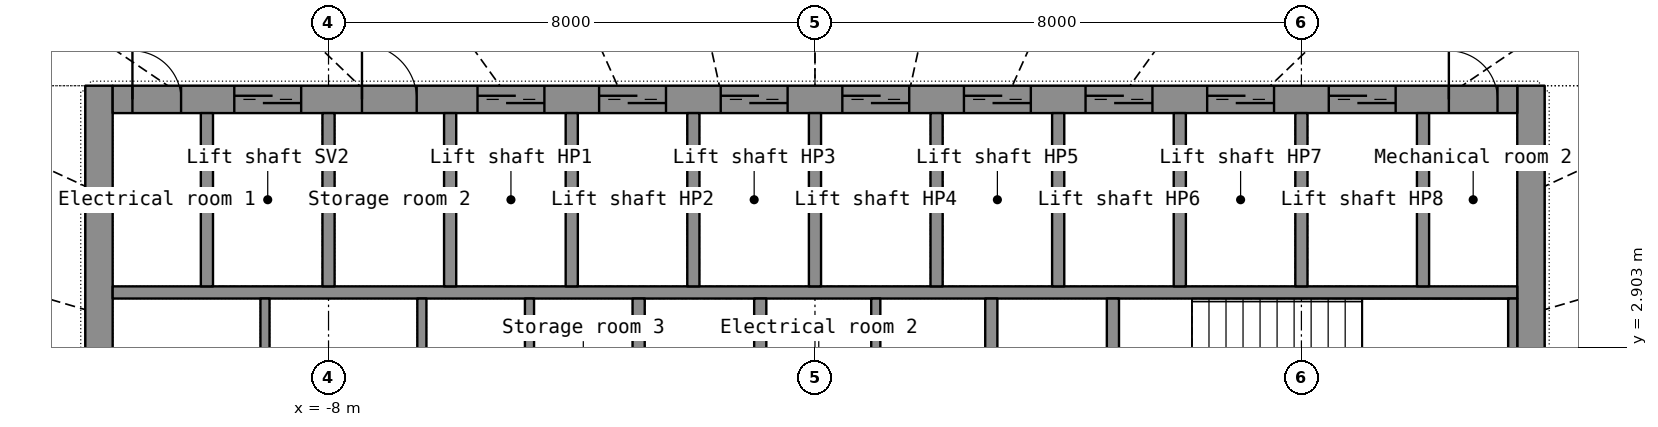
"""IFC4 building model, lengths in metres.
Left out: names, types, materials, properties, quantities, classifications, styles, units other than length and angle.
Written with IfcOpenShell. Run it as: python <this file> out.ifc"""

import sys

from ifc_helpers import new_model, si_unit, direction, frame, frame_2d, origin, place, context, subcontext, project, spatial, rectangle, extrude, element, fill, save


model = new_model("IFC4")
c1 = context("Model", 3, precision=1e-05, world=origin(), true_north=direction((0.0, 1.0)))
c2 = subcontext(c1, "Body", "Model", "MODEL_VIEW")
j1 = project(units=[si_unit("LENGTHUNIT", "METRE"), si_unit("PLANEANGLEUNIT", "RADIAN")], contexts=[c1])
p1 = place(None, origin())
s1 = spatial("IfcSite", under=j1, at=p1, CompositionType="ELEMENT")
p2 = place(p1, origin())
s2 = spatial("IfcBuilding", under=s1, at=p2, CompositionType="ELEMENT")
p3 = place(p2, frame((0.0, 0.0, 175.6)))
s3 = spatial("IfcBuildingStorey", under=s2, at=p3, CompositionType="ELEMENT", Elevation=175.6)
p4 = place(p3, frame((-11.775, -7.2, 0.0), z_axis=(0.0, 0.0, 1.0), x_axis=(0.0, 1.0, 0.0)))
e1 = element("IfcWall", 1, at=p4, inside=s3, PredefinedType="SHEAR", context=c2, shape_type="SweptSolid", body=[
    extrude(rectangle(XDim=14.4, YDim=0.45, at=frame_2d((7.2, 0.0))), origin(), (0.0, 0.0, 1.0), 3.3),
])
p5 = place(p4, frame((6.5, 0.0, 0.0)))
e2 = element("IfcOpeningElement", 2, at=p5, cuts=e1, PredefinedType="OPENING", context=c2, shape_type="SweptSolid", body=[
    extrude(rectangle(XDim=1.4, YDim=2.2, at=frame_2d((0.7, 1.1))), frame((0.0, 0.235, 0.0), z_axis=(0.0, -1.0, 0.0), x_axis=(1.0, 0.0, 0.0)), (0.0, 0.0, 1.0), 0.47),
])
p6 = place(p3, frame((11.775, -7.2, 0.0), z_axis=(0.0, 0.0, 1.0), x_axis=(0.0, 1.0, 0.0)))
e3 = element("IfcWall", 3, at=p6, inside=s3, PredefinedType="SHEAR", context=c2, shape_type="SweptSolid", body=[
    extrude(rectangle(XDim=14.4, YDim=0.45, at=frame_2d((7.2, 0.0))), origin(), (0.0, 0.0, 1.0), 3.3),
])
p7 = place(p6, frame((6.5, 0.0, 0.0)))
e4 = element("IfcOpeningElement", 4, at=p7, cuts=e3, PredefinedType="OPENING", context=c2, shape_type="SweptSolid", body=[
    extrude(rectangle(XDim=1.4, YDim=2.2, at=frame_2d((0.7, 1.1))), frame((0.0, 0.235, 0.0), z_axis=(0.0, -1.0, 0.0), x_axis=(1.0, 0.0, 0.0)), (0.0, 0.0, 1.0), 0.47),
])
p8 = place(p3, frame((-11.55, 6.975, 0.0), z_axis=(0.0, 0.0, 1.0), x_axis=(1.0, 0.0, 0.0)))
e5 = element("IfcWall", 5, at=p8, inside=s3, PredefinedType="SHEAR", context=c2, shape_type="SweptSolid", body=[
    extrude(rectangle(XDim=23.1, YDim=0.45, at=frame_2d((11.55, 0.0))), origin(), (0.0, 0.0, 1.0), 3.3),
])
p9 = place(p8, frame((2.0, 0.0, 0.0)))
e6 = element("IfcOpeningElement", 6, at=p9, cuts=e5, PredefinedType="OPENING", context=c2, shape_type="SweptSolid", body=[
    extrude(rectangle(XDim=1.1, YDim=2.2, at=frame_2d((0.55, 1.1))), frame((0.0, 0.235, 0.0), z_axis=(0.0, -1.0, 0.0), x_axis=(1.0, 0.0, 0.0)), (0.0, 0.0, 1.0), 0.47),
])
p10 = place(p8, frame((6.0, 0.0, 0.0)))
e7 = element("IfcOpeningElement", 7, at=p10, cuts=e5, PredefinedType="OPENING", context=c2, shape_type="SweptSolid", body=[
    extrude(rectangle(XDim=1.1, YDim=2.2, at=frame_2d((0.55, 1.1))), frame((0.0, 0.235, 0.0), z_axis=(0.0, -1.0, 0.0), x_axis=(1.0, 0.0, 0.0)), (0.0, 0.0, 1.0), 0.47),
])
p11 = place(p8, frame((8.0, 0.0, 0.0)))
e8 = element("IfcOpeningElement", 8, at=p11, cuts=e5, PredefinedType="OPENING", context=c2, shape_type="SweptSolid", body=[
    extrude(rectangle(XDim=1.1, YDim=2.2, at=frame_2d((0.55, 1.1))), frame((0.0, 0.235, 0.0), z_axis=(0.0, -1.0, 0.0), x_axis=(1.0, 0.0, 0.0)), (0.0, 0.0, 1.0), 0.47),
])
p12 = place(p8, frame((10.0, 0.0, 0.0)))
e9 = element("IfcOpeningElement", 9, at=p12, cuts=e5, PredefinedType="OPENING", context=c2, shape_type="SweptSolid", body=[
    extrude(rectangle(XDim=1.1, YDim=2.2, at=frame_2d((0.55, 1.1))), frame((0.0, 0.235, 0.0), z_axis=(0.0, -1.0, 0.0), x_axis=(1.0, 0.0, 0.0)), (0.0, 0.0, 1.0), 0.47),
])
p13 = place(p8, frame((12.0, 0.0, 0.0)))
e10 = element("IfcOpeningElement", 10, at=p13, cuts=e5, PredefinedType="OPENING", context=c2, shape_type="SweptSolid", body=[
    extrude(rectangle(XDim=1.1, YDim=2.2, at=frame_2d((0.55, 1.1))), frame((0.0, 0.235, 0.0), z_axis=(0.0, -1.0, 0.0), x_axis=(1.0, 0.0, 0.0)), (0.0, 0.0, 1.0), 0.47),
])
p14 = place(p8, frame((14.0, 0.0, 0.0)))
e11 = element("IfcOpeningElement", 11, at=p14, cuts=e5, PredefinedType="OPENING", context=c2, shape_type="SweptSolid", body=[
    extrude(rectangle(XDim=1.1, YDim=2.2, at=frame_2d((0.55, 1.1))), frame((0.0, 0.235, 0.0), z_axis=(0.0, -1.0, 0.0), x_axis=(1.0, 0.0, 0.0)), (0.0, 0.0, 1.0), 0.47),
])
p15 = place(p8, frame((16.0, 0.0, 0.0)))
e12 = element("IfcOpeningElement", 12, at=p15, cuts=e5, PredefinedType="OPENING", context=c2, shape_type="SweptSolid", body=[
    extrude(rectangle(XDim=1.1, YDim=2.2, at=frame_2d((0.55, 1.1))), frame((0.0, 0.235, 0.0), z_axis=(0.0, -1.0, 0.0), x_axis=(1.0, 0.0, 0.0)), (0.0, 0.0, 1.0), 0.47),
])
p16 = place(p8, frame((18.0, 0.0, 0.0)))
e13 = element("IfcOpeningElement", 13, at=p16, cuts=e5, PredefinedType="OPENING", context=c2, shape_type="SweptSolid", body=[
    extrude(rectangle(XDim=1.1, YDim=2.2, at=frame_2d((0.55, 1.1))), frame((0.0, 0.235, 0.0), z_axis=(0.0, -1.0, 0.0), x_axis=(1.0, 0.0, 0.0)), (0.0, 0.0, 1.0), 0.47),
])
p17 = place(p8, frame((20.0, 0.0, 0.0)))
e14 = element("IfcOpeningElement", 14, at=p17, cuts=e5, PredefinedType="OPENING", context=c2, shape_type="SweptSolid", body=[
    extrude(rectangle(XDim=1.1, YDim=2.2, at=frame_2d((0.55, 1.1))), frame((0.0, 0.235, 0.0), z_axis=(0.0, -1.0, 0.0), x_axis=(1.0, 0.0, 0.0)), (0.0, 0.0, 1.0), 0.47),
])
p18 = place(p8, frame((4.1, 0.0, 0.0)))
e15 = element("IfcOpeningElement", 15, at=p18, cuts=e5, PredefinedType="OPENING", context=c2, shape_type="SweptSolid", body=[
    extrude(rectangle(XDim=0.9, YDim=2.1, at=frame_2d((0.45, 1.05))), frame((0.0, 0.235, 0.0), z_axis=(0.0, -1.0, 0.0), x_axis=(1.0, 0.0, 0.0)), (0.0, 0.0, 1.0), 0.47),
])
p19 = place(p8, frame((0.325, 0.0, 0.0)))
e16 = element("IfcOpeningElement", 16, at=p19, cuts=e5, PredefinedType="OPENING", context=c2, shape_type="SweptSolid", body=[
    extrude(rectangle(XDim=0.8, YDim=2.05, at=frame_2d((0.4, 1.025))), frame((0.0, 0.235, 0.0), z_axis=(0.0, -1.0, 0.0), x_axis=(1.0, 0.0, 0.0)), (0.0, 0.0, 1.0), 0.47),
])
p20 = place(p8, frame((21.975, 0.0, 0.0)))
e17 = element("IfcOpeningElement", 17, at=p20, cuts=e5, PredefinedType="OPENING", context=c2, shape_type="SweptSolid", body=[
    extrude(rectangle(XDim=0.8, YDim=2.05, at=frame_2d((0.4, 1.025))), frame((0.0, 0.235, 0.0), z_axis=(0.0, -1.0, 0.0), x_axis=(1.0, 0.0, 0.0)), (0.0, 0.0, 1.0), 0.47),
])
p21 = place(p3, frame((-11.55, 3.8, 0.0), z_axis=(0.0, 0.0, 1.0), x_axis=(1.0, 0.0, 0.0)))
e18 = element("IfcWall", 18, at=p21, inside=s3, PredefinedType="SHEAR", context=c2, shape_type="SweptSolid", body=[
    extrude(rectangle(XDim=23.1, YDim=0.2, at=frame_2d((11.55, 0.0))), origin(), (0.0, 0.0, 1.0), 3.3),
])
for number, where, z_axis, x_axis in (
    (19, (-10.0, 3.9, 0.0), (0.0, 0.0, 1.0), (0.0, 1.0, 0.0)),
    (20, (-8.0, 3.9, 0.0), (0.0, 0.0, 1.0), (0.0, 1.0, 0.0)),
    (21, (-6.0, 3.9, 0.0), (0.0, 0.0, 1.0), (0.0, 1.0, 0.0)),
    (22, (-4.0, 3.9, 0.0), (0.0, 0.0, 1.0), (0.0, 1.0, 0.0)),
    (23, (-2.0, 3.9, 0.0), (0.0, 0.0, 1.0), (0.0, 1.0, 0.0)),
    (24, (0.0, 3.9, 0.0), (0.0, 0.0, 1.0), (0.0, 1.0, 0.0)),
    (25, (2.0, 3.9, 0.0), (0.0, 0.0, 1.0), (0.0, 1.0, 0.0)),
    (26, (4.0, 3.9, 0.0), (0.0, 0.0, 1.0), (0.0, 1.0, 0.0)),
    (27, (6.0, 3.9, 0.0), (0.0, 0.0, 1.0), (0.0, 1.0, 0.0)),
    (28, (8.0, 3.9, 0.0), (0.0, 0.0, 1.0), (0.0, 1.0, 0.0)),
    (29, (10.0, 3.9, 0.0), (0.0, 0.0, 1.0), (0.0, 1.0, 0.0)),
):
    element("IfcWall", number, at=place(p3, frame(where, z_axis=z_axis, x_axis=x_axis)), inside=s3, PredefinedType="SHEAR", context=c2, shape_type="SweptSolid", body=[
        extrude(rectangle(XDim=2.85, YDim=0.2, at=frame_2d((1.425, 0.0))), origin(), (0.0, 0.0, 1.0), 3.3),
    ])
p22 = place(p3, frame((-2.9, -3.7, 0.0), z_axis=(0.0, 0.0, 1.0), x_axis=(0.0, 1.0, 0.0)))
e30 = element("IfcWall", 30, at=p22, inside=s3, PredefinedType="SHEAR", context=c2, shape_type="SweptSolid", body=[
    extrude(rectangle(XDim=7.4, YDim=0.2, at=frame_2d((3.7, 0.0))), origin(), (0.0, 0.0, 1.0), 3.3),
])
p23 = place(p22, frame((3.1, 0.0, 0.0)))
e31 = element("IfcOpeningElement", 31, at=p23, cuts=e30, PredefinedType="OPENING", context=c2, shape_type="SweptSolid", body=[
    extrude(rectangle(XDim=1.2, YDim=2.2, at=frame_2d((0.6, 1.1))), frame((0.0, 0.11, 0.0), z_axis=(0.0, -1.0, 0.0), x_axis=(1.0, 0.0, 0.0)), (0.0, 0.0, 1.0), 0.22),
])
p24 = place(p3, frame((2.9, -3.7, 0.0), z_axis=(0.0, 0.0, 1.0), x_axis=(0.0, 1.0, 0.0)))
e32 = element("IfcWall", 32, at=p24, inside=s3, PredefinedType="SHEAR", context=c2, shape_type="SweptSolid", body=[
    extrude(rectangle(XDim=7.4, YDim=0.2, at=frame_2d((3.7, 0.0))), origin(), (0.0, 0.0, 1.0), 3.3),
])
p25 = place(p24, frame((3.1, 0.0, 0.0)))
e33 = element("IfcOpeningElement", 33, at=p25, cuts=e32, PredefinedType="OPENING", context=c2, shape_type="SweptSolid", body=[
    extrude(rectangle(XDim=1.2, YDim=2.2, at=frame_2d((0.6, 1.1))), frame((0.0, 0.11, 0.0), z_axis=(0.0, -1.0, 0.0), x_axis=(1.0, 0.0, 0.0)), (0.0, 0.0, 1.0), 0.22),
])
p26 = place(p3, frame((-0.9, 1.35, 0.0), z_axis=(0.0, 0.0, 1.0), x_axis=(0.0, 1.0, 0.0)))
e34 = element("IfcWall", 34, at=p26, inside=s3, PredefinedType="SHEAR", context=c2, shape_type="SweptSolid", body=[
    extrude(rectangle(XDim=2.35, YDim=0.2, at=frame_2d((1.175, 0.0))), origin(), (0.0, 0.0, 1.0), 3.3),
])
p27 = place(p3, frame((11.475, 1.35, 0.0), z_axis=(0.0, 0.0, 1.0), x_axis=(0.0, 1.0, 0.0)))
e35 = element("IfcWall", 35, at=p27, inside=s3, PredefinedType="SHEAR", context=c2, shape_type="SweptSolid", body=[
    extrude(rectangle(XDim=2.35, YDim=0.15, at=frame_2d((1.175, 0.0))), origin(), (0.0, 0.0, 1.0), 3.3),
])
p28 = place(p3, frame((4.9, 1.35, 0.0), z_axis=(0.0, 0.0, 1.0), x_axis=(0.0, 1.0, 0.0)))
e36 = element("IfcWall", 36, at=p28, inside=s3, PredefinedType="SHEAR", context=c2, shape_type="SweptSolid", body=[
    extrude(rectangle(XDim=2.35, YDim=0.2, at=frame_2d((1.175, 0.0))), origin(), (0.0, 0.0, 1.0), 3.3),
])
for number, where, z_axis, x_axis in (
    (37, (-9.045, 1.35, 0.0), (0.0, 0.0, 1.0), (0.0, 1.0, 0.0)),
    (38, (-6.465, 1.35, 0.0), (0.0, 0.0, 1.0), (0.0, 1.0, 0.0)),
    (39, (-4.695, 1.35, 0.0), (0.0, 0.0, 1.0), (0.0, 1.0, 0.0)),
    (40, (1.0, 1.35, 0.0), (0.0, 0.0, 1.0), (0.0, 1.0, 0.0)),
):
    element("IfcWall", number, at=place(p3, frame(where, z_axis=z_axis, x_axis=x_axis)), inside=s3, PredefinedType="PARTITIONING", context=c2, shape_type="SweptSolid", body=[
        extrude(rectangle(XDim=2.35, YDim=0.15, at=frame_2d((1.175, 0.0))), origin(), (0.0, 0.0, 1.0), 3.3),
    ])
p29 = place(p9, origin())
e41 = element("IfcDoor", 41, at=p29, inside=s3, OperationType="DOUBLE_DOOR_SLIDING", PredefinedType="DOOR", context=c2, shape_type="SweptSolid", body=[
    extrude(rectangle(XDim=1.1, YDim=2.2, at=frame_2d((0.55, 1.1))), frame((0.0, 0.025, 0.0), z_axis=(0.0, -1.0, 0.0), x_axis=(1.0, 0.0, 0.0)), (0.0, 0.0, 1.0), 0.05),
])
fill(e6, e41)
p30 = place(p10, origin())
e42 = element("IfcDoor", 42, at=p30, inside=s3, OperationType="DOUBLE_DOOR_SLIDING", PredefinedType="DOOR", context=c2, shape_type="SweptSolid", body=[
    extrude(rectangle(XDim=1.1, YDim=2.2, at=frame_2d((0.55, 1.1))), frame((0.0, 0.025, 0.0), z_axis=(0.0, -1.0, 0.0), x_axis=(1.0, 0.0, 0.0)), (0.0, 0.0, 1.0), 0.05),
])
fill(e7, e42)
p31 = place(p11, origin())
e43 = element("IfcDoor", 43, at=p31, inside=s3, OperationType="DOUBLE_DOOR_SLIDING", PredefinedType="DOOR", context=c2, shape_type="SweptSolid", body=[
    extrude(rectangle(XDim=1.1, YDim=2.2, at=frame_2d((0.55, 1.1))), frame((0.0, 0.025, 0.0), z_axis=(0.0, -1.0, 0.0), x_axis=(1.0, 0.0, 0.0)), (0.0, 0.0, 1.0), 0.05),
])
fill(e8, e43)
p32 = place(p12, origin())
e44 = element("IfcDoor", 44, at=p32, inside=s3, OperationType="DOUBLE_DOOR_SLIDING", PredefinedType="DOOR", context=c2, shape_type="SweptSolid", body=[
    extrude(rectangle(XDim=1.1, YDim=2.2, at=frame_2d((0.55, 1.1))), frame((0.0, 0.025, 0.0), z_axis=(0.0, -1.0, 0.0), x_axis=(1.0, 0.0, 0.0)), (0.0, 0.0, 1.0), 0.05),
])
fill(e9, e44)
p33 = place(p13, origin())
e45 = element("IfcDoor", 45, at=p33, inside=s3, OperationType="DOUBLE_DOOR_SLIDING", PredefinedType="DOOR", context=c2, shape_type="SweptSolid", body=[
    extrude(rectangle(XDim=1.1, YDim=2.2, at=frame_2d((0.55, 1.1))), frame((0.0, 0.025, 0.0), z_axis=(0.0, -1.0, 0.0), x_axis=(1.0, 0.0, 0.0)), (0.0, 0.0, 1.0), 0.05),
])
fill(e10, e45)
p34 = place(p14, origin())
e46 = element("IfcDoor", 46, at=p34, inside=s3, OperationType="DOUBLE_DOOR_SLIDING", PredefinedType="DOOR", context=c2, shape_type="SweptSolid", body=[
    extrude(rectangle(XDim=1.1, YDim=2.2, at=frame_2d((0.55, 1.1))), frame((0.0, 0.025, 0.0), z_axis=(0.0, -1.0, 0.0), x_axis=(1.0, 0.0, 0.0)), (0.0, 0.0, 1.0), 0.05),
])
fill(e11, e46)
p35 = place(p15, origin())
e47 = element("IfcDoor", 47, at=p35, inside=s3, OperationType="DOUBLE_DOOR_SLIDING", PredefinedType="DOOR", context=c2, shape_type="SweptSolid", body=[
    extrude(rectangle(XDim=1.1, YDim=2.2, at=frame_2d((0.55, 1.1))), frame((0.0, 0.025, 0.0), z_axis=(0.0, -1.0, 0.0), x_axis=(1.0, 0.0, 0.0)), (0.0, 0.0, 1.0), 0.05),
])
fill(e12, e47)
p36 = place(p16, origin())
e48 = element("IfcDoor", 48, at=p36, inside=s3, OperationType="DOUBLE_DOOR_SLIDING", PredefinedType="DOOR", context=c2, shape_type="SweptSolid", body=[
    extrude(rectangle(XDim=1.1, YDim=2.2, at=frame_2d((0.55, 1.1))), frame((0.0, 0.025, 0.0), z_axis=(0.0, -1.0, 0.0), x_axis=(1.0, 0.0, 0.0)), (0.0, 0.0, 1.0), 0.05),
])
fill(e13, e48)
p37 = place(p17, origin())
e49 = element("IfcDoor", 49, at=p37, inside=s3, OperationType="DOUBLE_DOOR_SLIDING", PredefinedType="DOOR", context=c2, shape_type="SweptSolid", body=[
    extrude(rectangle(XDim=1.1, YDim=2.2, at=frame_2d((0.55, 1.1))), frame((0.0, 0.025, 0.0), z_axis=(0.0, -1.0, 0.0), x_axis=(1.0, 0.0, 0.0)), (0.0, 0.0, 1.0), 0.05),
])
fill(e14, e49)
p38 = place(p18, origin())
e50 = element("IfcDoor", 50, at=p38, inside=s3, OperationType="SINGLE_SWING_LEFT", PredefinedType="DOOR", context=c2, shape_type="SweptSolid", body=[
    extrude(rectangle(XDim=0.9, YDim=2.1, at=frame_2d((0.45, 1.05))), frame((0.0, 0.025, 0.0), z_axis=(0.0, -1.0, 0.0), x_axis=(1.0, 0.0, 0.0)), (0.0, 0.0, 1.0), 0.05),
])
fill(e15, e50)
p39 = place(p19, origin())
e51 = element("IfcDoor", 51, at=p39, inside=s3, OperationType="SINGLE_SWING_LEFT", PredefinedType="DOOR", context=c2, shape_type="SweptSolid", body=[
    extrude(rectangle(XDim=0.8, YDim=2.05, at=frame_2d((0.4, 1.025))), frame((0.0, 0.025, 0.0), z_axis=(0.0, -1.0, 0.0), x_axis=(1.0, 0.0, 0.0)), (0.0, 0.0, 1.0), 0.05),
])
fill(e16, e51)
p40 = place(p20, origin())
e52 = element("IfcDoor", 52, at=p40, inside=s3, OperationType="SINGLE_SWING_LEFT", PredefinedType="DOOR", context=c2, shape_type="SweptSolid", body=[
    extrude(rectangle(XDim=0.8, YDim=2.05, at=frame_2d((0.4, 1.025))), frame((0.0, 0.025, 0.0), z_axis=(0.0, -1.0, 0.0), x_axis=(1.0, 0.0, 0.0)), (0.0, 0.0, 1.0), 0.05),
])
fill(e17, e52)
save(model, sys.argv[1])
